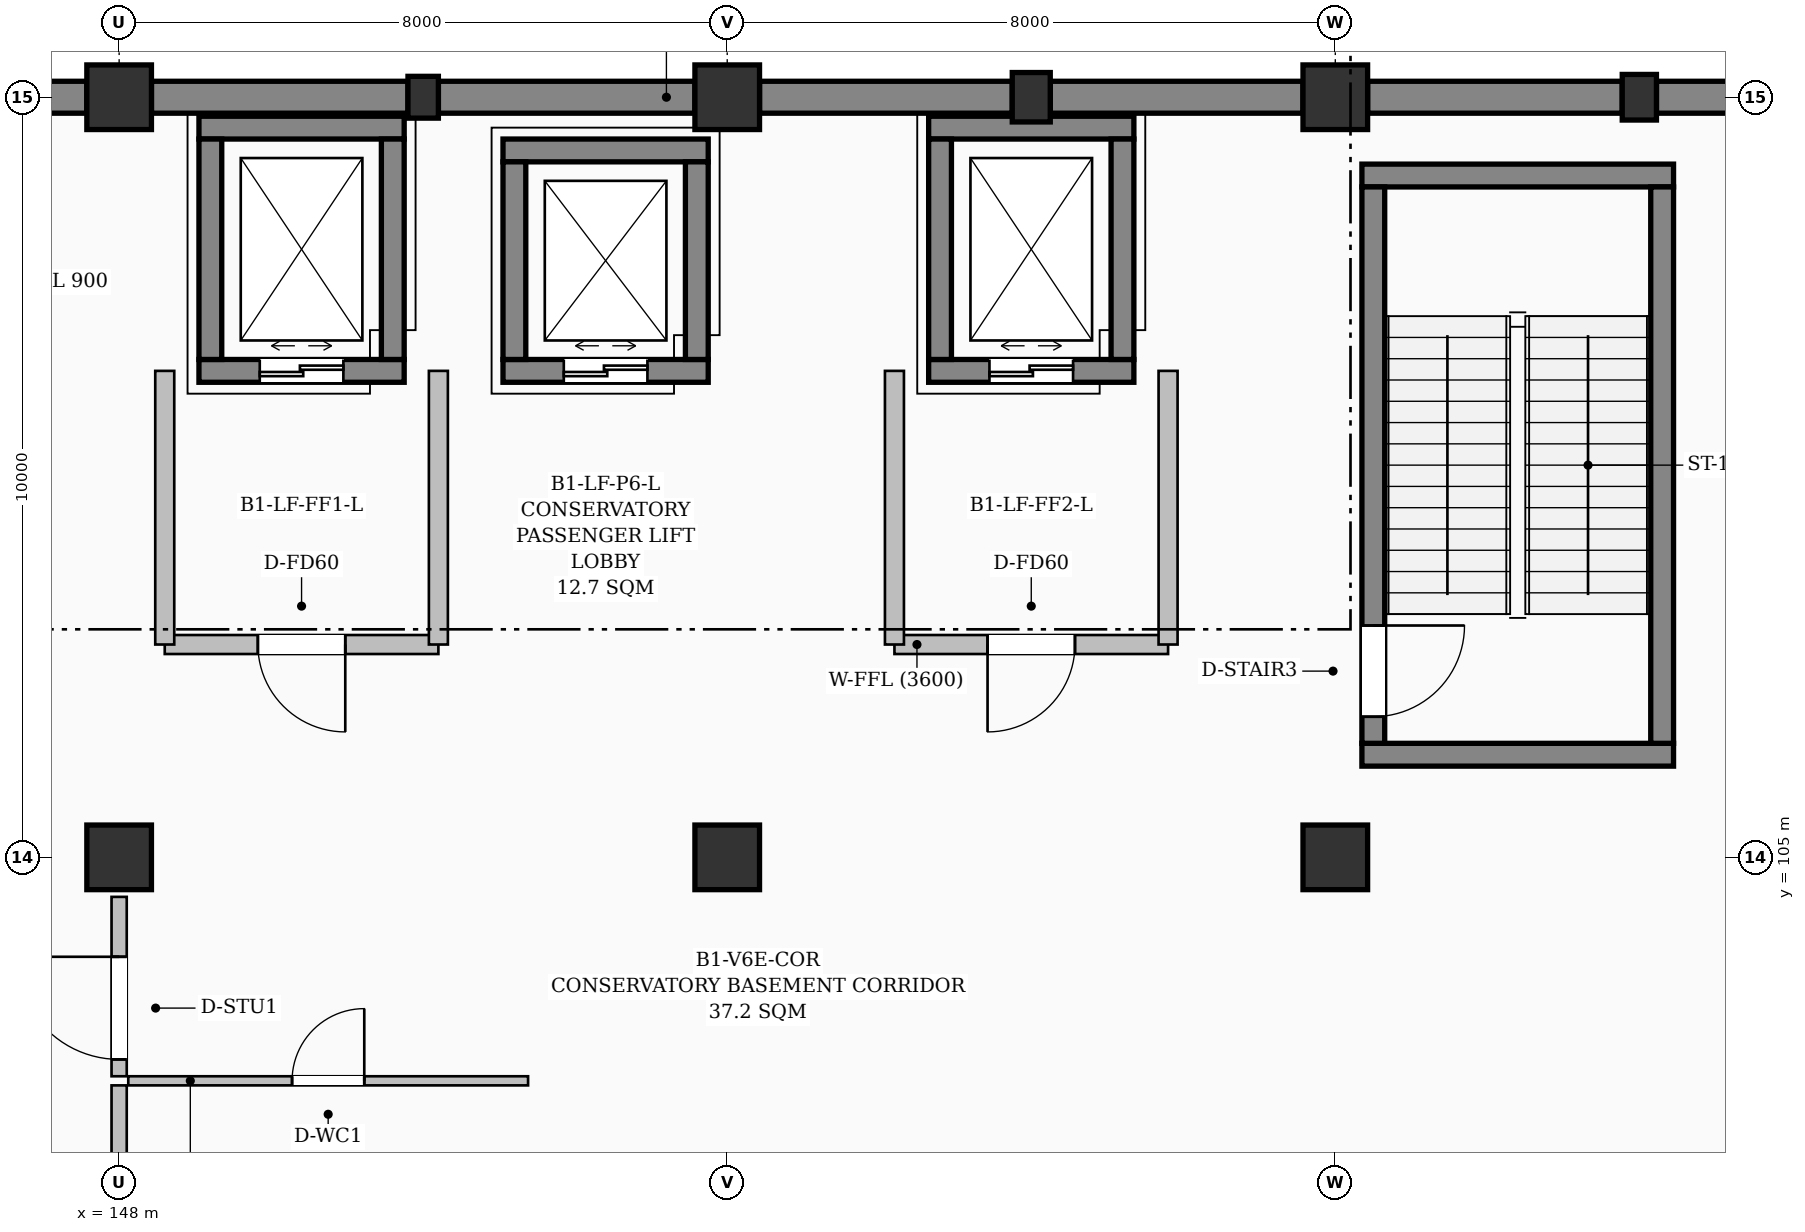
"""IFC4 building model, lengths in metres.
Left out: names, types, materials, properties, quantities, classifications, styles, units other than length and angle.
Written with IfcOpenShell. Run it as: python <this file> out.ifc"""

import sys

from ifc_helpers import new_model, si_unit, direction, frame, frame_2d, origin, origin_2d, place, context, subcontext, project, spatial, rectangle, extrude, element, fill, save


model = new_model("IFC4")
c1 = context("Model", 3, precision=1e-05, world=origin(), true_north=direction((0.0, 1.0)))
c2 = subcontext(c1, "Body", "Model", "MODEL_VIEW")
j1 = project(units=[si_unit("LENGTHUNIT", "METRE"), si_unit("PLANEANGLEUNIT", "RADIAN")], contexts=[c1])
p1 = place(None, origin())
s1 = spatial("IfcSite", under=j1, at=p1, CompositionType="ELEMENT")
p2 = place(p1, origin())
s2 = spatial("IfcBuilding", under=s1, at=p2, CompositionType="ELEMENT")
p3 = place(p2, frame((0.0, 0.0, -4.8)))
s3 = spatial("IfcBuildingStorey", under=s2, at=p3, CompositionType="ELEMENT", Elevation=-4.8)
for number, where, z_axis, x_axis in (
    (1, (148.0, 105.0, -0.38), (0.0, 0.0, 1.0), (1.0, 0.0, 0.0)),
    (2, (148.0, 115.0, -0.38), (0.0, 0.0, 1.0), (1.0, 0.0, 0.0)),
):
    element("IfcColumn", number, at=place(p3, frame(where, z_axis=z_axis, x_axis=x_axis)), inside=s3, PredefinedType="COLUMN", context=c2, shape_type="SweptSolid", body=[
        extrude(rectangle(XDim=0.85, YDim=0.85, at=origin_2d()), origin(), (0.0, 0.0, 1.0), 5.18),
    ])
p4 = place(p3, frame((152.0, 115.0, -0.38), z_axis=(0.0, 0.0, 1.0), x_axis=(1.0, 0.0, 0.0)))
e3 = element("IfcColumn", 3, at=p4, inside=s3, PredefinedType="PILASTER", context=c2, shape_type="SweptSolid", body=[
    extrude(rectangle(XDim=0.4, YDim=0.55, at=origin_2d()), origin(), (0.0, 0.0, 1.0), 5.18),
])
for number, where, z_axis, x_axis in (
    (4, (156.0, 105.0, -0.38), (0.0, 0.0, 1.0), (1.0, 0.0, 0.0)),
    (5, (156.0, 115.0, -0.38), (0.0, 0.0, 1.0), (1.0, 0.0, 0.0)),
):
    element("IfcColumn", number, at=place(p3, frame(where, z_axis=z_axis, x_axis=x_axis)), inside=s3, PredefinedType="COLUMN", context=c2, shape_type="SweptSolid", body=[
        extrude(rectangle(XDim=0.85, YDim=0.85, at=origin_2d()), origin(), (0.0, 0.0, 1.0), 5.18),
    ])
p5 = place(p3, frame((160.0, 115.0, -0.38), z_axis=(0.0, 0.0, 1.0), x_axis=(1.0, 0.0, 0.0)))
e6 = element("IfcColumn", 6, at=p5, inside=s3, PredefinedType="PILASTER", context=c2, shape_type="SweptSolid", body=[
    extrude(rectangle(XDim=0.5, YDim=0.65, at=origin_2d()), origin(), (0.0, 0.0, 1.0), 5.18),
])
for number, where, z_axis, x_axis in (
    (7, (164.0, 105.0, -0.38), (0.0, 0.0, 1.0), (1.0, 0.0, 0.0)),
    (8, (164.0, 115.0, -0.38), (0.0, 0.0, 1.0), (1.0, 0.0, 0.0)),
):
    element("IfcColumn", number, at=place(p3, frame(where, z_axis=z_axis, x_axis=x_axis)), inside=s3, PredefinedType="COLUMN", context=c2, shape_type="SweptSolid", body=[
        extrude(rectangle(XDim=0.85, YDim=0.85, at=origin_2d()), origin(), (0.0, 0.0, 1.0), 5.18),
    ])
p6 = place(p3, frame((168.0, 115.0, -0.38), z_axis=(0.0, 0.0, 1.0), x_axis=(1.0, 0.0, 0.0)))
e9 = element("IfcColumn", 9, at=p6, inside=s3, PredefinedType="PILASTER", context=c2, shape_type="SweptSolid", body=[
    extrude(rectangle(XDim=0.45, YDim=0.6, at=origin_2d()), origin(), (0.0, 0.0, 1.0), 5.18),
])
p7 = place(p3, frame((144.225, 115.0, 0.0), z_axis=(0.0, 0.0, 1.0), x_axis=(1.0, 0.0, 0.0)))
e10 = element("IfcWall", 10, at=p7, inside=s3, PredefinedType="USERDEFINED", context=c2, shape_type="SweptSolid", body=[
    extrude(rectangle(XDim=3.35, YDim=0.42, at=frame_2d((1.675, 0.0))), origin(), (0.0, 0.0, 1.0), 3.85),
])
for number, where, z_axis, x_axis in (
    (11, (148.425, 115.0, 0.0), (0.0, 0.0, 1.0), (1.0, 0.0, 0.0)),
    (12, (152.2, 115.0, 0.0), (0.0, 0.0, 1.0), (1.0, 0.0, 0.0)),
):
    element("IfcWall", number, at=place(p3, frame(where, z_axis=z_axis, x_axis=x_axis)), inside=s3, PredefinedType="USERDEFINED", context=c2, shape_type="SweptSolid", body=[
        extrude(rectangle(XDim=3.375, YDim=0.42, at=frame_2d((1.688, 0.0))), origin(), (0.0, 0.0, 1.0), 3.85),
    ])
for number, where, z_axis, x_axis in (
    (13, (156.425, 115.0, 0.0), (0.0, 0.0, 1.0), (1.0, 0.0, 0.0)),
    (14, (160.25, 115.0, 0.0), (0.0, 0.0, 1.0), (1.0, 0.0, 0.0)),
):
    element("IfcWall", number, at=place(p3, frame(where, z_axis=z_axis, x_axis=x_axis)), inside=s3, PredefinedType="USERDEFINED", context=c2, shape_type="SweptSolid", body=[
        extrude(rectangle(XDim=3.325, YDim=0.42, at=frame_2d((1.663, 0.0))), origin(), (0.0, 0.0, 1.0), 3.85),
    ])
for number, where, z_axis, x_axis in (
    (15, (164.425, 115.0, 0.0), (0.0, 0.0, 1.0), (1.0, 0.0, 0.0)),
    (16, (168.225, 115.0, 0.0), (0.0, 0.0, 1.0), (1.0, 0.0, 0.0)),
):
    element("IfcWall", number, at=place(p3, frame(where, z_axis=z_axis, x_axis=x_axis)), inside=s3, PredefinedType="USERDEFINED", context=c2, shape_type="SweptSolid", body=[
        extrude(rectangle(XDim=3.35, YDim=0.42, at=frame_2d((1.675, 0.0))), origin(), (0.0, 0.0, 1.0), 3.85),
    ])
for number, where, z_axis, x_axis in (
    (17, (164.35, 106.35, -0.38), (0.0, 0.0, 1.0), (1.0, 0.0, 0.0)),
    (18, (168.45, 113.97, -0.38), (0.0, 0.0, 1.0), (-1.0, 0.0, 0.0)),
):
    element("IfcWall", number, at=place(p3, frame(where, z_axis=z_axis, x_axis=x_axis)), inside=s3, PredefinedType="SHEAR", context=c2, shape_type="SweptSolid", body=[
        extrude(rectangle(XDim=4.1, YDim=0.3, at=frame_2d((2.05, 0.0))), origin(), (0.0, 0.0, 1.0), 4.88),
    ])
p8 = place(p3, frame((164.5, 113.82, -0.38), z_axis=(0.0, 0.0, 1.0), x_axis=(0.0, -1.0, 0.0)))
e19 = element("IfcWall", 19, at=p8, inside=s3, PredefinedType="SHEAR", context=c2, shape_type="SweptSolid", body=[
    extrude(rectangle(XDim=7.32, YDim=0.3, at=frame_2d((3.66, 0.0))), origin(), (0.0, 0.0, 1.0), 4.88),
])
p9 = place(p8, frame((5.77, 0.0, 0.38)))
e20 = element("IfcOpeningElement", 20, at=p9, cuts=e19, PredefinedType="OPENING", context=c2, shape_type="SweptSolid", body=[
    extrude(rectangle(XDim=1.2, YDim=2.15, at=frame_2d((0.6, 1.075))), frame((0.0, 0.16, 0.0), z_axis=(0.0, -1.0, 0.0), x_axis=(1.0, 0.0, 0.0)), (0.0, 0.0, 1.0), 0.32),
])
p10 = place(p3, frame((168.3, 113.82, -0.38), z_axis=(0.0, 0.0, 1.0), x_axis=(0.0, -1.0, 0.0)))
e21 = element("IfcWall", 21, at=p10, inside=s3, PredefinedType="SHEAR", context=c2, shape_type="SweptSolid", body=[
    extrude(rectangle(XDim=7.32, YDim=0.3, at=frame_2d((3.66, 0.0))), origin(), (0.0, 0.0, 1.0), 4.88),
])
p11 = place(p3, frame((149.05, 111.4, -1.2), z_axis=(0.0, 0.0, 1.0), x_axis=(1.0, 0.0, 0.0)))
e22 = element("IfcWall", 22, at=p11, inside=s3, PredefinedType="SHEAR", context=c2, shape_type="SweptSolid", body=[
    extrude(rectangle(XDim=2.7, YDim=0.3, at=frame_2d((1.35, 0.0))), origin(), (0.0, 0.0, 1.0), 5.7),
])
p12 = place(p11, frame((0.8, 0.0, 1.2)))
e23 = element("IfcOpeningElement", 23, at=p12, cuts=e22, PredefinedType="OPENING", context=c2, shape_type="SweptSolid", body=[
    extrude(rectangle(XDim=1.1, YDim=2.15, at=frame_2d((0.55, 1.075))), frame((0.0, 0.16, 0.0), z_axis=(0.0, -1.0, 0.0), x_axis=(1.0, 0.0, 0.0)), (0.0, 0.0, 1.0), 0.32),
])
p13 = place(p3, frame((151.75, 114.6, -1.2), z_axis=(0.0, 0.0, 1.0), x_axis=(-1.0, 0.0, 0.0)))
e24 = element("IfcWall", 24, at=p13, inside=s3, PredefinedType="SHEAR", context=c2, shape_type="SweptSolid", body=[
    extrude(rectangle(XDim=2.7, YDim=0.3, at=frame_2d((1.35, 0.0))), origin(), (0.0, 0.0, 1.0), 5.7),
])
for number, where, z_axis, x_axis in (
    (25, (149.2, 111.55, -1.2), (0.0, 0.0, 1.0), (0.0, 1.0, 0.0)),
    (26, (151.6, 114.45, -1.2), (0.0, 0.0, 1.0), (0.0, -1.0, 0.0)),
):
    element("IfcWall", number, at=place(p3, frame(where, z_axis=z_axis, x_axis=x_axis)), inside=s3, PredefinedType="SHEAR", context=c2, shape_type="SweptSolid", body=[
        extrude(rectangle(XDim=2.9, YDim=0.3, at=frame_2d((1.45, 0.0))), origin(), (0.0, 0.0, 1.0), 5.7),
    ])
p14 = place(p3, frame((152.2, 107.8, 0.0), z_axis=(0.0, 0.0, 1.0), x_axis=(-1.0, 0.0, 0.0)))
e27 = element("IfcWall", 27, at=p14, inside=s3, PredefinedType="SOLIDWALL", context=c2, shape_type="SweptSolid", body=[
    extrude(rectangle(XDim=3.6, YDim=0.25, at=frame_2d((1.8, 0.0))), origin(), (0.0, 0.0, 1.0), 4.5),
])
p15 = place(p14, frame((1.225, 0.0, 0.0)))
e28 = element("IfcOpeningElement", 28, at=p15, cuts=e27, PredefinedType="OPENING", context=c2, shape_type="SweptSolid", body=[
    extrude(rectangle(XDim=1.15, YDim=2.15, at=frame_2d((0.575, 1.075))), frame((0.0, 0.135, 0.0), z_axis=(0.0, -1.0, 0.0), x_axis=(1.0, 0.0, 0.0)), (0.0, 0.0, 1.0), 0.27),
])
for number, where, z_axis, x_axis in (
    (29, (148.6, 107.8, 0.0), (0.0, 0.0, 1.0), (0.0, 1.0, 0.0)),
    (30, (152.2, 111.4, 0.0), (0.0, 0.0, 1.0), (0.0, -1.0, 0.0)),
):
    element("IfcWall", number, at=place(p3, frame(where, z_axis=z_axis, x_axis=x_axis)), inside=s3, PredefinedType="SOLIDWALL", context=c2, shape_type="SweptSolid", body=[
        extrude(rectangle(XDim=3.6, YDim=0.25, at=frame_2d((1.8, 0.0))), origin(), (0.0, 0.0, 1.0), 4.5),
    ])
p16 = place(p3, frame((158.65, 111.4, -1.2), z_axis=(0.0, 0.0, 1.0), x_axis=(1.0, 0.0, 0.0)))
e31 = element("IfcWall", 31, at=p16, inside=s3, PredefinedType="SHEAR", context=c2, shape_type="SweptSolid", body=[
    extrude(rectangle(XDim=2.7, YDim=0.3, at=frame_2d((1.35, 0.0))), origin(), (0.0, 0.0, 1.0), 5.7),
])
p17 = place(p16, frame((0.8, 0.0, 1.2)))
e32 = element("IfcOpeningElement", 32, at=p17, cuts=e31, PredefinedType="OPENING", context=c2, shape_type="SweptSolid", body=[
    extrude(rectangle(XDim=1.1, YDim=2.15, at=frame_2d((0.55, 1.075))), frame((0.0, 0.16, 0.0), z_axis=(0.0, -1.0, 0.0), x_axis=(1.0, 0.0, 0.0)), (0.0, 0.0, 1.0), 0.32),
])
p18 = place(p3, frame((161.35, 114.6, -1.2), z_axis=(0.0, 0.0, 1.0), x_axis=(-1.0, 0.0, 0.0)))
e33 = element("IfcWall", 33, at=p18, inside=s3, PredefinedType="SHEAR", context=c2, shape_type="SweptSolid", body=[
    extrude(rectangle(XDim=2.7, YDim=0.3, at=frame_2d((1.35, 0.0))), origin(), (0.0, 0.0, 1.0), 5.7),
])
for number, where, z_axis, x_axis in (
    (34, (158.8, 111.55, -1.2), (0.0, 0.0, 1.0), (0.0, 1.0, 0.0)),
    (35, (161.2, 114.45, -1.2), (0.0, 0.0, 1.0), (0.0, -1.0, 0.0)),
):
    element("IfcWall", number, at=place(p3, frame(where, z_axis=z_axis, x_axis=x_axis)), inside=s3, PredefinedType="SHEAR", context=c2, shape_type="SweptSolid", body=[
        extrude(rectangle(XDim=2.9, YDim=0.3, at=frame_2d((1.45, 0.0))), origin(), (0.0, 0.0, 1.0), 5.7),
    ])
p19 = place(p3, frame((161.8, 107.8, 0.0), z_axis=(0.0, 0.0, 1.0), x_axis=(-1.0, 0.0, 0.0)))
e36 = element("IfcWall", 36, at=p19, inside=s3, PredefinedType="SOLIDWALL", context=c2, shape_type="SweptSolid", body=[
    extrude(rectangle(XDim=3.6, YDim=0.25, at=frame_2d((1.8, 0.0))), origin(), (0.0, 0.0, 1.0), 4.5),
])
p20 = place(p19, frame((1.225, 0.0, 0.0)))
e37 = element("IfcOpeningElement", 37, at=p20, cuts=e36, PredefinedType="OPENING", context=c2, shape_type="SweptSolid", body=[
    extrude(rectangle(XDim=1.15, YDim=2.15, at=frame_2d((0.575, 1.075))), frame((0.0, 0.135, 0.0), z_axis=(0.0, -1.0, 0.0), x_axis=(1.0, 0.0, 0.0)), (0.0, 0.0, 1.0), 0.27),
])
for number, where, z_axis, x_axis in (
    (38, (158.2, 107.8, 0.0), (0.0, 0.0, 1.0), (0.0, 1.0, 0.0)),
    (39, (161.8, 111.4, 0.0), (0.0, 0.0, 1.0), (0.0, -1.0, 0.0)),
):
    element("IfcWall", number, at=place(p3, frame(where, z_axis=z_axis, x_axis=x_axis)), inside=s3, PredefinedType="SOLIDWALL", context=c2, shape_type="SweptSolid", body=[
        extrude(rectangle(XDim=3.6, YDim=0.25, at=frame_2d((1.8, 0.0))), origin(), (0.0, 0.0, 1.0), 4.5),
    ])
p21 = place(p3, frame((153.05, 111.4, -1.2), z_axis=(0.0, 0.0, 1.0), x_axis=(1.0, 0.0, 0.0)))
e40 = element("IfcWall", 40, at=p21, inside=s3, PredefinedType="SHEAR", context=c2, shape_type="SweptSolid", body=[
    extrude(rectangle(XDim=2.7, YDim=0.3, at=frame_2d((1.35, 0.0))), origin(), (0.0, 0.0, 1.0), 5.7),
])
p22 = place(p21, frame((0.8, 0.0, 1.2)))
e41 = element("IfcOpeningElement", 41, at=p22, cuts=e40, PredefinedType="OPENING", context=c2, shape_type="SweptSolid", body=[
    extrude(rectangle(XDim=1.1, YDim=2.15, at=frame_2d((0.55, 1.075))), frame((0.0, 0.16, 0.0), z_axis=(0.0, -1.0, 0.0), x_axis=(1.0, 0.0, 0.0)), (0.0, 0.0, 1.0), 0.32),
])
p23 = place(p3, frame((155.75, 114.3, -1.2), z_axis=(0.0, 0.0, 1.0), x_axis=(-1.0, 0.0, 0.0)))
e42 = element("IfcWall", 42, at=p23, inside=s3, PredefinedType="SHEAR", context=c2, shape_type="SweptSolid", body=[
    extrude(rectangle(XDim=2.7, YDim=0.3, at=frame_2d((1.35, 0.0))), origin(), (0.0, 0.0, 1.0), 5.7),
])
for number, where, z_axis, x_axis in (
    (43, (153.2, 111.55, -1.2), (0.0, 0.0, 1.0), (0.0, 1.0, 0.0)),
    (44, (155.6, 114.15, -1.2), (0.0, 0.0, 1.0), (0.0, -1.0, 0.0)),
):
    element("IfcWall", number, at=place(p3, frame(where, z_axis=z_axis, x_axis=x_axis)), inside=s3, PredefinedType="SHEAR", context=c2, shape_type="SweptSolid", body=[
        extrude(rectangle(XDim=2.6, YDim=0.3, at=frame_2d((1.3, 0.0))), origin(), (0.0, 0.0, 1.0), 5.7),
    ])
p24 = place(p3, frame((148.0, 102.12, 0.0), z_axis=(0.0, 0.0, 1.0), x_axis=(0.0, 1.0, 0.0)))
e45 = element("IfcWall", 45, at=p24, inside=s3, PredefinedType="PARTITIONING", context=c2, shape_type="SweptSolid", body=[
    extrude(rectangle(XDim=2.36, YDim=0.2, at=frame_2d((1.18, 0.0))), origin(), (0.0, 0.0, 1.0), 4.035),
])
p25 = place(p24, frame((0.222, 0.0, 0.0)))
e46 = element("IfcOpeningElement", 46, at=p25, cuts=e45, PredefinedType="OPENING", context=c2, shape_type="SweptSolid", body=[
    extrude(rectangle(XDim=1.35, YDim=2.2, at=frame_2d((0.675, 1.1))), frame((0.0, 0.11, 0.0), z_axis=(0.0, -1.0, 0.0), x_axis=(1.0, 0.0, 0.0)), (0.0, 0.0, 1.0), 0.22),
])
p26 = place(p3, frame((148.0, 95.445, 0.0), z_axis=(0.0, 0.0, 1.0), x_axis=(0.0, 1.0, 0.0)))
e47 = element("IfcWall", 47, at=p26, inside=s3, PredefinedType="PARTITIONING", context=c2, shape_type="SweptSolid", body=[
    extrude(rectangle(XDim=6.555, YDim=0.2, at=frame_2d((3.277, 0.0))), origin(), (0.0, 0.0, 1.0), 4.035),
])
p27 = place(p26, frame((2.603, 0.0, 0.0)))
e48 = element("IfcOpeningElement", 48, at=p27, cuts=e47, PredefinedType="OPENING", context=c2, shape_type="SweptSolid", body=[
    extrude(rectangle(XDim=1.35, YDim=2.2, at=frame_2d((0.675, 1.1))), frame((0.0, 0.11, 0.0), z_axis=(0.0, -1.0, 0.0), x_axis=(1.0, 0.0, 0.0)), (0.0, 0.0, 1.0), 0.22),
])
p28 = place(p3, frame((148.12, 102.06, 0.0), z_axis=(0.0, 0.0, 1.0), x_axis=(1.0, 0.0, 0.0)))
e49 = element("IfcWall", 49, at=p28, inside=s3, PredefinedType="PARTITIONING", context=c2, shape_type="SweptSolid", body=[
    extrude(rectangle(XDim=5.26, YDim=0.12, at=frame_2d((2.63, 0.0))), origin(), (0.0, 0.0, 1.0), 4.125),
])
p29 = place(p28, frame((2.155, 0.0, 0.0)))
e50 = element("IfcOpeningElement", 50, at=p29, cuts=e49, PredefinedType="OPENING", context=c2, shape_type="SweptSolid", body=[
    extrude(rectangle(XDim=0.95, YDim=2.1, at=frame_2d((0.475, 1.05))), frame((0.0, 0.07, 0.0), z_axis=(0.0, -1.0, 0.0), x_axis=(1.0, 0.0, 0.0)), (0.0, 0.0, 1.0), 0.14),
])
p30 = place(p9, origin())
e51 = element("IfcDoor", 51, at=p30, inside=s3, OperationType="SINGLE_SWING_LEFT", PredefinedType="DOOR", context=c2, shape_type="SweptSolid", body=[
    extrude(rectangle(XDim=1.2, YDim=2.15, at=frame_2d((0.6, 1.075))), frame((0.0, 0.025, 0.0), z_axis=(0.0, -1.0, 0.0), x_axis=(1.0, 0.0, 0.0)), (0.0, 0.0, 1.0), 0.05),
])
fill(e20, e51)
p31 = place(p12, origin())
e52 = element("IfcDoor", 52, at=p31, inside=s3, OperationType="DOUBLE_DOOR_SLIDING", PredefinedType="DOOR", context=c2, shape_type="SweptSolid", body=[
    extrude(rectangle(XDim=1.1, YDim=2.15, at=frame_2d((0.55, 1.075))), frame((0.0, 0.025, 0.0), z_axis=(0.0, -1.0, 0.0), x_axis=(1.0, 0.0, 0.0)), (0.0, 0.0, 1.0), 0.05),
])
fill(e23, e52)
p32 = place(p15, origin())
e53 = element("IfcDoor", 53, at=p32, inside=s3, OperationType="SINGLE_SWING_LEFT", PredefinedType="DOOR", context=c2, shape_type="SweptSolid", body=[
    extrude(rectangle(XDim=1.15, YDim=2.15, at=frame_2d((0.575, 1.075))), frame((0.0, 0.025, 0.0), z_axis=(0.0, -1.0, 0.0), x_axis=(1.0, 0.0, 0.0)), (0.0, 0.0, 1.0), 0.05),
])
fill(e28, e53)
p33 = place(p17, origin())
e54 = element("IfcDoor", 54, at=p33, inside=s3, OperationType="DOUBLE_DOOR_SLIDING", PredefinedType="DOOR", context=c2, shape_type="SweptSolid", body=[
    extrude(rectangle(XDim=1.1, YDim=2.15, at=frame_2d((0.55, 1.075))), frame((0.0, 0.025, 0.0), z_axis=(0.0, -1.0, 0.0), x_axis=(1.0, 0.0, 0.0)), (0.0, 0.0, 1.0), 0.05),
])
fill(e32, e54)
p34 = place(p20, origin())
e55 = element("IfcDoor", 55, at=p34, inside=s3, OperationType="SINGLE_SWING_RIGHT", PredefinedType="DOOR", context=c2, shape_type="SweptSolid", body=[
    extrude(rectangle(XDim=1.15, YDim=2.15, at=frame_2d((0.575, 1.075))), frame((0.0, 0.025, 0.0), z_axis=(0.0, -1.0, 0.0), x_axis=(1.0, 0.0, 0.0)), (0.0, 0.0, 1.0), 0.05),
])
fill(e37, e55)
p35 = place(p22, origin())
e56 = element("IfcDoor", 56, at=p35, inside=s3, OperationType="DOUBLE_DOOR_SLIDING", PredefinedType="DOOR", context=c2, shape_type="SweptSolid", body=[
    extrude(rectangle(XDim=1.1, YDim=2.15, at=frame_2d((0.55, 1.075))), frame((0.0, 0.025, 0.0), z_axis=(0.0, -1.0, 0.0), x_axis=(1.0, 0.0, 0.0)), (0.0, 0.0, 1.0), 0.05),
])
fill(e41, e56)
p36 = place(p25, origin())
e57 = element("IfcDoor", 57, at=p36, inside=s3, OperationType="SINGLE_SWING_RIGHT", PredefinedType="DOOR", context=c2, shape_type="SweptSolid", body=[
    extrude(rectangle(XDim=1.35, YDim=2.2, at=frame_2d((0.675, 1.1))), frame((0.0, 0.025, 0.0), z_axis=(0.0, -1.0, 0.0), x_axis=(1.0, 0.0, 0.0)), (0.0, 0.0, 1.0), 0.05),
])
fill(e46, e57)
p37 = place(p29, origin())
e58 = element("IfcDoor", 58, at=p37, inside=s3, OperationType="SINGLE_SWING_RIGHT", PredefinedType="DOOR", context=c2, shape_type="SweptSolid", body=[
    extrude(rectangle(XDim=0.95, YDim=2.1, at=frame_2d((0.475, 1.05))), frame((0.0, 0.025, 0.0), z_axis=(0.0, -1.0, 0.0), x_axis=(1.0, 0.0, 0.0)), (0.0, 0.0, 1.0), 0.05),
])
fill(e50, e58)
save(model, sys.argv[1])
